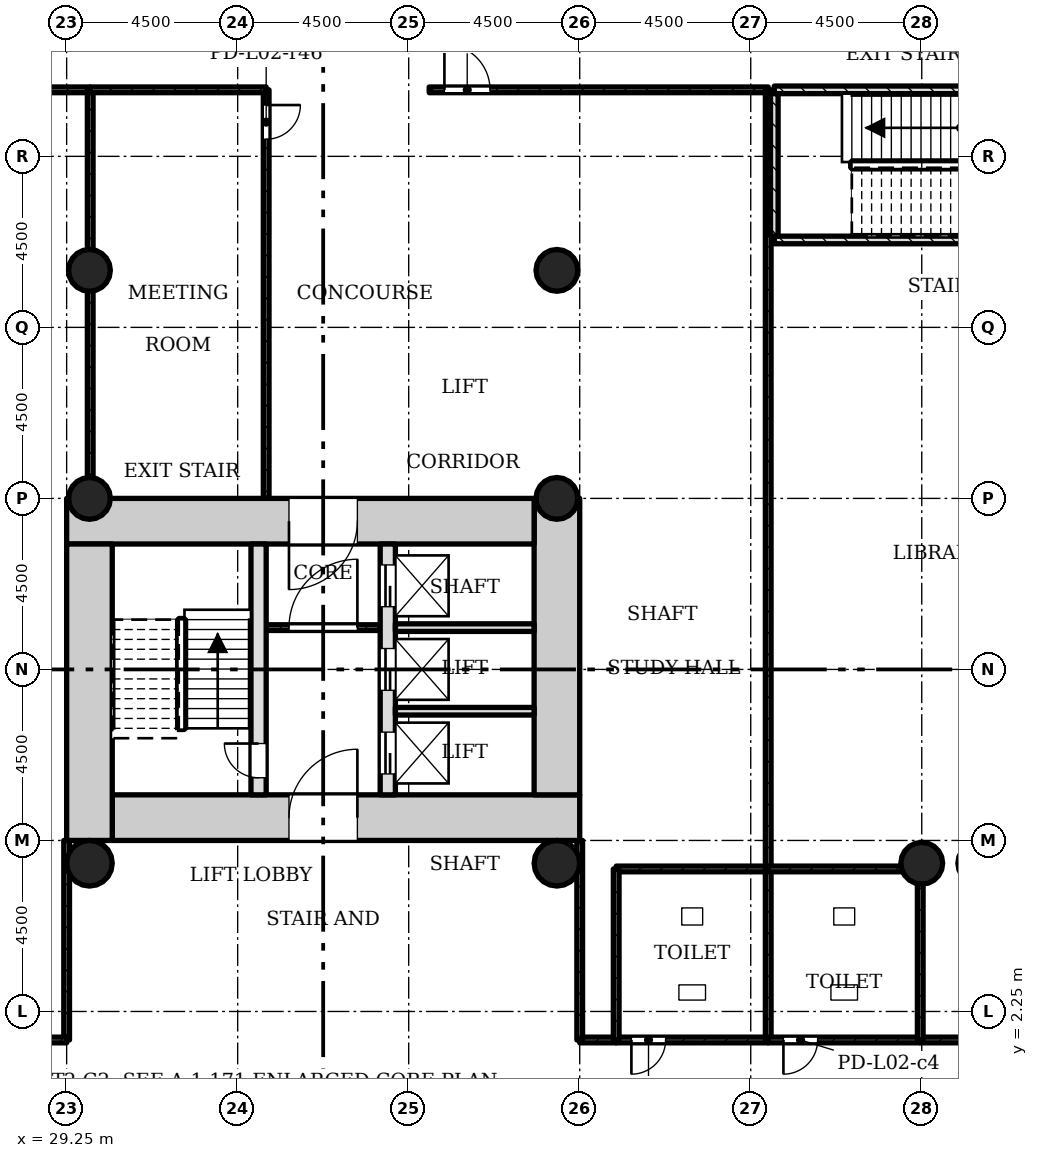
"""IFC4 building model, lengths in metres.
Left out: names, types, materials, properties, quantities, classifications, styles, units other than length and angle.
Written with IfcOpenShell. Run it as: python <this file> out.ifc"""

import sys

from ifc_helpers import new_model, si_unit, direction, frame, frame_2d, origin, origin_2d, place, context, subcontext, project, spatial, rectangle, hollow_circle, extrude, element, fill, save


model = new_model("IFC4")
c1 = context("Model", 3, precision=1e-05, world=origin(), true_north=direction((0.0, 1.0)))
c2 = subcontext(c1, "Body", "Model", "MODEL_VIEW")
j1 = project(units=[si_unit("LENGTHUNIT", "METRE"), si_unit("PLANEANGLEUNIT", "RADIAN")], contexts=[c1])
p1 = place(None, origin())
s1 = spatial("IfcSite", under=j1, at=p1, CompositionType="ELEMENT")
p2 = place(p1, origin())
s2 = spatial("IfcBuilding", under=s1, at=p2, CompositionType="ELEMENT")
p3 = place(p2, frame((0.0, 0.0, 11.0)))
s3 = spatial("IfcBuildingStorey", under=s2, at=p3, CompositionType="ELEMENT", Elevation=11.0)
p4 = place(p3, frame((30.45, 7.35, 0.0), z_axis=(0.0, 0.0, 1.0), x_axis=(1.0, 0.0, 0.0)))
e1 = element("IfcWall", 1, at=p4, inside=s3, PredefinedType="SHEAR", context=c2, shape_type="SweptSolid", body=[
    extrude(rectangle(XDim=12.3, YDim=1.2, at=frame_2d((6.15, 0.0))), origin(), (0.0, 0.0, 1.0), 4.5),
])
p5 = place(p4, frame((4.65, 0.0, 0.0)))
e2 = element("IfcOpeningElement", 2, at=p5, cuts=e1, PredefinedType="OPENING", context=c2, shape_type="SweptSolid", body=[
    extrude(rectangle(XDim=1.8, YDim=2.1, at=frame_2d((0.9, 1.05))), frame((0.0, 0.61, 0.0), z_axis=(0.0, -1.0, 0.0), x_axis=(1.0, 0.0, 0.0)), (0.0, 0.0, 1.0), 1.22),
])
p6 = place(p3, frame((42.15, 7.95, 0.0), z_axis=(0.0, 0.0, 1.0), x_axis=(0.0, 1.0, 0.0)))
e3 = element("IfcWall", 3, at=p6, inside=s3, PredefinedType="SHEAR", context=c2, shape_type="SweptSolid", body=[
    extrude(rectangle(XDim=7.8, YDim=1.2, at=frame_2d((3.9, 0.0))), origin(), (0.0, 0.0, 1.0), 4.5),
])
p7 = place(p3, frame((41.55, 15.15, 0.0), z_axis=(0.0, 0.0, 1.0), x_axis=(-1.0, 0.0, 0.0)))
e4 = element("IfcWall", 4, at=p7, inside=s3, PredefinedType="SHEAR", context=c2, shape_type="SweptSolid", body=[
    extrude(rectangle(XDim=12.3, YDim=1.2, at=frame_2d((6.15, 0.0))), origin(), (0.0, 0.0, 1.0), 4.5),
])
p8 = place(p7, frame((4.65, 0.0, 0.0)))
e5 = element("IfcOpeningElement", 5, at=p8, cuts=e4, PredefinedType="OPENING", context=c2, shape_type="SweptSolid", body=[
    extrude(rectangle(XDim=1.8, YDim=2.1, at=frame_2d((0.9, 1.05))), frame((0.0, 0.61, 0.0), z_axis=(0.0, -1.0, 0.0), x_axis=(1.0, 0.0, 0.0)), (0.0, 0.0, 1.0), 1.22),
])
p9 = place(p3, frame((29.85, 14.55, 0.0), z_axis=(0.0, 0.0, 1.0), x_axis=(0.0, -1.0, 0.0)))
e6 = element("IfcWall", 6, at=p9, inside=s3, PredefinedType="SHEAR", context=c2, shape_type="SweptSolid", body=[
    extrude(rectangle(XDim=7.8, YDim=1.2, at=frame_2d((3.9, 0.0))), origin(), (0.0, 0.0, 1.0), 4.5),
])
p10 = place(p3, frame((34.3, 7.95, 0.0), z_axis=(0.0, 0.0, 1.0), x_axis=(0.0, 1.0, 0.0)))
e7 = element("IfcWall", 7, at=p10, inside=s3, PredefinedType="SHEAR", context=c2, shape_type="SweptSolid", body=[
    extrude(rectangle(XDim=6.6, YDim=0.4, at=frame_2d((3.3, 0.0))), origin(), (0.0, 0.0, 1.0), 4.5),
])
p11 = place(p10, frame((0.45, 0.0, 0.0)))
e8 = element("IfcOpeningElement", 8, at=p11, cuts=e7, PredefinedType="OPENING", context=c2, shape_type="SweptSolid", body=[
    extrude(rectangle(XDim=0.9, YDim=2.1, at=frame_2d((0.45, 1.05))), frame((0.0, 0.21, 0.0), z_axis=(0.0, -1.0, 0.0), x_axis=(1.0, 0.0, 0.0)), (0.0, 0.0, 1.0), 0.42),
])
p12 = place(p3, frame((37.7, 7.95, 0.0), z_axis=(0.0, 0.0, 1.0), x_axis=(0.0, 1.0, 0.0)))
e9 = element("IfcWall", 9, at=p12, inside=s3, PredefinedType="SHEAR", context=c2, shape_type="SweptSolid", body=[
    extrude(rectangle(XDim=6.6, YDim=0.4, at=frame_2d((3.3, 0.0))), origin(), (0.0, 0.0, 1.0), 4.5),
])
p13 = place(p12, frame((0.55, 0.0, 0.0)))
e10 = element("IfcOpeningElement", 10, at=p13, cuts=e9, PredefinedType="OPENING", context=c2, shape_type="SweptSolid", body=[
    extrude(rectangle(XDim=1.1, YDim=2.1, at=frame_2d((0.55, 1.05))), frame((0.0, 0.21, 0.0), z_axis=(0.0, -1.0, 0.0), x_axis=(1.0, 0.0, 0.0)), (0.0, 0.0, 1.0), 0.42),
])
p14 = place(p12, frame((2.75, 0.0, 0.0)))
e11 = element("IfcOpeningElement", 11, at=p14, cuts=e9, PredefinedType="OPENING", context=c2, shape_type="SweptSolid", body=[
    extrude(rectangle(XDim=1.1, YDim=2.1, at=frame_2d((0.55, 1.05))), frame((0.0, 0.21, 0.0), z_axis=(0.0, -1.0, 0.0), x_axis=(1.0, 0.0, 0.0)), (0.0, 0.0, 1.0), 0.42),
])
p15 = place(p12, frame((4.95, 0.0, 0.0)))
e12 = element("IfcOpeningElement", 12, at=p15, cuts=e9, PredefinedType="OPENING", context=c2, shape_type="SweptSolid", body=[
    extrude(rectangle(XDim=1.1, YDim=2.1, at=frame_2d((0.55, 1.05))), frame((0.0, 0.21, 0.0), z_axis=(0.0, -1.0, 0.0), x_axis=(1.0, 0.0, 0.0)), (0.0, 0.0, 1.0), 0.42),
])
for number, where, z_axis, x_axis in (
    (13, (42.15, 15.75, 0.0), (0.0, 0.0, 1.0), (1.0, 0.0, 0.0)),
    (14, (29.85, 15.75, 0.0), (0.0, 0.0, 1.0), (1.0, 0.0, 0.0)),
    (15, (42.15, 21.75, 0.0), (0.0, 0.0, 1.0), (1.0, 0.0, 0.0)),
    (16, (29.85, 21.75, 0.0), (0.0, 0.0, 1.0), (1.0, 0.0, 0.0)),
    (17, (51.75, 6.15, 0.0), (0.0, 0.0, 1.0), (1.0, 0.0, 0.0)),
    (18, (53.25, 6.15, 0.0), (0.0, 0.0, 1.0), (1.0, 0.0, 0.0)),
):
    element("IfcColumn", number, at=place(p3, frame(where, z_axis=z_axis, x_axis=x_axis)), inside=s3, PredefinedType="COLUMN", context=c2, shape_type="SweptSolid", body=[
        extrude(hollow_circle(Radius=0.55, WallThickness=0.04, at=origin_2d()), origin(), (0.0, 0.0, 1.0), 4.5),
    ])
for number, where, z_axis, x_axis in (
    (19, (42.15, 6.15, 0.0), (0.0, 0.0, 1.0), (1.0, 0.0, 0.0)),
    (20, (29.85, 6.15, 0.0), (0.0, 0.0, 1.0), (1.0, 0.0, 0.0)),
):
    element("IfcColumn", number, at=place(p3, frame(where, z_axis=z_axis, x_axis=x_axis)), inside=s3, PredefinedType="COLUMN", context=c2, shape_type="SweptSolid", body=[
        extrude(hollow_circle(Radius=0.6, WallThickness=0.045, at=origin_2d()), origin(), (0.0, 0.0, 1.0), 4.5),
    ])
p16 = place(p3, frame((37.5, 12.35, 0.0), z_axis=(0.0, 0.0, 1.0), x_axis=(-1.0, 0.0, 0.0)))
e21 = element("IfcWall", 21, at=p16, inside=s3, PredefinedType="PARTITIONING", context=c2, shape_type="SweptSolid", body=[
    extrude(rectangle(XDim=3.0, YDim=0.15, at=frame_2d((1.5, 0.0))), origin(), (0.0, 0.0, 1.0), 4.08),
])
p17 = place(p16, frame((0.6, 0.0, 0.0)))
e22 = element("IfcOpeningElement", 22, at=p17, cuts=e21, PredefinedType="OPENING", context=c2, shape_type="SweptSolid", body=[
    extrude(rectangle(XDim=1.8, YDim=2.1, at=frame_2d((0.9, 1.05))), frame((0.0, 0.085, 0.0), z_axis=(0.0, -1.0, 0.0), x_axis=(1.0, 0.0, 0.0)), (0.0, 0.0, 1.0), 0.17),
])
for number, where, z_axis, x_axis in (
    (23, (41.55, 10.15, 0.0), (0.0, 0.0, 1.0), (-1.0, 0.0, 0.0)),
    (24, (41.55, 12.35, 0.0), (0.0, 0.0, 1.0), (-1.0, 0.0, 0.0)),
):
    element("IfcWall", number, at=place(p3, frame(where, z_axis=z_axis, x_axis=x_axis)), inside=s3, PredefinedType="SOLIDWALL", context=c2, shape_type="SweptSolid", body=[
        extrude(rectangle(XDim=3.65, YDim=0.2, at=frame_2d((1.825, 0.0))), origin(), (0.0, 0.0, 1.0), 4.08),
    ])
p18 = place(p3, frame((20.95, 26.5, 0.0), z_axis=(0.0, 0.0, 1.0), x_axis=(1.0, 0.0, 0.0)))
e25 = element("IfcWall", 25, at=p18, inside=s3, PredefinedType="PARTITIONING", context=c2, shape_type="SweptSolid", body=[
    extrude(rectangle(XDim=8.92, YDim=0.15, at=frame_2d((4.46, 0.0))), origin(), (0.0, 0.0, 1.0), 4.08),
])
p19 = place(p18, frame((0.4, 0.0, 0.0)))
e26 = element("IfcOpeningElement", 26, at=p19, cuts=e25, PredefinedType="OPENING", context=c2, shape_type="SweptSolid", body=[
    extrude(rectangle(XDim=1.2, YDim=2.1, at=frame_2d((0.6, 1.05))), frame((0.0, 0.085, 0.0), z_axis=(0.0, -1.0, 0.0), x_axis=(1.0, 0.0, 0.0)), (0.0, 0.0, 1.0), 0.17),
])
p20 = place(p3, frame((29.25, 6.75, 0.0), z_axis=(0.0, 0.0, 1.0), x_axis=(0.0, -1.0, 0.0)))
e27 = element("IfcWall", 27, at=p20, inside=s3, PredefinedType="PARTITIONING", context=c2, shape_type="SweptSolid", body=[
    extrude(rectangle(XDim=5.25, YDim=0.15, at=frame_2d((2.625, 0.0))), origin(), (0.0, 0.0, 1.0), 4.08),
])
p21 = place(p3, frame((29.25, 1.5, 0.0), z_axis=(0.0, 0.0, 1.0), x_axis=(-1.0, 0.0, 0.0)))
e28 = element("IfcWall", 28, at=p21, inside=s3, PredefinedType="PARTITIONING", context=c2, shape_type="SweptSolid", body=[
    extrude(rectangle(XDim=8.3, YDim=0.15, at=frame_2d((4.15, 0.0))), origin(), (0.0, 0.0, 1.0), 4.08),
])
p22 = place(p3, frame((29.87, 26.5, 0.0), z_axis=(0.0, 0.0, 1.0), x_axis=(0.0, -1.0, 0.0)))
e29 = element("IfcWall", 29, at=p22, inside=s3, PredefinedType="PARTITIONING", context=c2, shape_type="SweptSolid", body=[
    extrude(rectangle(XDim=10.75, YDim=0.15, at=frame_2d((5.375, 0.0))), origin(), (0.0, 0.0, 1.0), 4.08),
])
p23 = place(p3, frame((34.5, 26.5, 0.0), z_axis=(0.0, 0.0, 1.0), x_axis=(0.0, -1.0, 0.0)))
e30 = element("IfcWall", 30, at=p23, inside=s3, PredefinedType="PARTITIONING", context=c2, shape_type="SweptSolid", body=[
    extrude(rectangle(XDim=10.75, YDim=0.15, at=frame_2d((5.375, 0.0))), origin(), (0.0, 0.0, 1.0), 4.08),
])
p24 = place(p23, frame((0.4, 0.0, 0.0)))
e31 = element("IfcOpeningElement", 31, at=p24, cuts=e30, PredefinedType="OPENING", context=c2, shape_type="SweptSolid", body=[
    extrude(rectangle(XDim=0.9, YDim=2.1, at=frame_2d((0.45, 1.05))), frame((0.0, 0.085, 0.0), z_axis=(0.0, -1.0, 0.0), x_axis=(1.0, 0.0, 0.0)), (0.0, 0.0, 1.0), 0.17),
])
p25 = place(p3, frame((29.87, 26.5, 0.0), z_axis=(0.0, 0.0, 1.0), x_axis=(1.0, 0.0, 0.0)))
e32 = element("IfcWall", 32, at=p25, inside=s3, PredefinedType="PARTITIONING", context=c2, shape_type="SweptSolid", body=[
    extrude(rectangle(XDim=4.63, YDim=0.15, at=frame_2d((2.315, 0.0))), origin(), (0.0, 0.0, 1.0), 4.08),
])
p26 = place(p3, frame((43.71, 1.5, 0.0), z_axis=(0.0, 0.0, 1.0), x_axis=(-1.0, 0.0, 0.0)))
e33 = element("IfcWall", 33, at=p26, inside=s3, PredefinedType="PARTITIONING", context=c2, shape_type="SweptSolid", body=[
    extrude(rectangle(XDim=0.96, YDim=0.15, at=frame_2d((0.48, 0.0))), origin(), (0.0, 0.0, 1.0), 4.08),
])
p27 = place(p3, frame((42.75, 1.5, 0.0), z_axis=(0.0, 0.0, 1.0), x_axis=(0.0, 1.0, 0.0)))
e34 = element("IfcWall", 34, at=p27, inside=s3, PredefinedType="PARTITIONING", context=c2, shape_type="SweptSolid", body=[
    extrude(rectangle(XDim=5.25, YDim=0.15, at=frame_2d((2.625, 0.0))), origin(), (0.0, 0.0, 1.0), 4.08),
])
p28 = place(p3, frame((38.79, 26.5, 0.0), z_axis=(0.0, 0.0, 1.0), x_axis=(1.0, 0.0, 0.0)))
e35 = element("IfcWall", 35, at=p28, inside=s3, PredefinedType="PARTITIONING", context=c2, shape_type="SweptSolid", body=[
    extrude(rectangle(XDim=8.92, YDim=0.15, at=frame_2d((4.46, 0.0))), origin(), (0.0, 0.0, 1.0), 4.08),
])
p29 = place(p28, frame((0.4, 0.0, 0.0)))
e36 = element("IfcOpeningElement", 36, at=p29, cuts=e35, PredefinedType="OPENING", context=c2, shape_type="SweptSolid", body=[
    extrude(rectangle(XDim=1.2, YDim=2.1, at=frame_2d((0.6, 1.05))), frame((0.0, 0.085, 0.0), z_axis=(0.0, -1.0, 0.0), x_axis=(1.0, 0.0, 0.0)), (0.0, 0.0, 1.0), 0.17),
])
p30 = place(p3, frame((47.71, 26.5, 0.0), z_axis=(0.0, 0.0, 1.0), x_axis=(0.0, -1.0, 0.0)))
e37 = element("IfcWall", 37, at=p30, inside=s3, PredefinedType="PARTITIONING", context=c2, shape_type="SweptSolid", body=[
    extrude(rectangle(XDim=20.5, YDim=0.15, at=frame_2d((10.25, 0.0))), origin(), (0.0, 0.0, 1.0), 4.08),
])
p31 = place(p3, frame((56.63, 1.5, 0.0), z_axis=(0.0, 0.0, 1.0), x_axis=(-1.0, 0.0, 0.0)))
e38 = element("IfcWall", 38, at=p31, inside=s3, PredefinedType="PARTITIONING", context=c2, shape_type="SweptSolid", body=[
    extrude(rectangle(XDim=4.92, YDim=0.15, at=frame_2d((2.46, 0.0))), origin(), (0.0, 0.0, 1.0), 4.08),
])
p32 = place(p31, frame((0.4, 0.0, 0.0)))
e39 = element("IfcOpeningElement", 39, at=p32, cuts=e38, PredefinedType="OPENING", context=c2, shape_type="SweptSolid", body=[
    extrude(rectangle(XDim=1.2, YDim=2.1, at=frame_2d((0.6, 1.05))), frame((0.0, 0.085, 0.0), z_axis=(0.0, -1.0, 0.0), x_axis=(1.0, 0.0, 0.0)), (0.0, 0.0, 1.0), 0.17),
])
p33 = place(p3, frame((43.71, 1.5, 0.0), z_axis=(0.0, 0.0, 1.0), x_axis=(1.0, 0.0, 0.0)))
e40 = element("IfcWall", 40, at=p33, inside=s3, PredefinedType="PARTITIONING", context=c2, shape_type="SweptSolid", body=[
    extrude(rectangle(XDim=4.0, YDim=0.15, at=frame_2d((2.0, 0.0))), origin(), (0.0, 0.0, 1.0), 4.08),
])
p34 = place(p33, frame((0.4, 0.0, 0.0)))
e41 = element("IfcOpeningElement", 41, at=p34, cuts=e40, PredefinedType="OPENING", context=c2, shape_type="SweptSolid", body=[
    extrude(rectangle(XDim=0.9, YDim=2.1, at=frame_2d((0.45, 1.05))), frame((0.0, 0.085, 0.0), z_axis=(0.0, -1.0, 0.0), x_axis=(1.0, 0.0, 0.0)), (0.0, 0.0, 1.0), 0.17),
])
p35 = place(p3, frame((47.71, 6.0, 0.0), z_axis=(0.0, 0.0, 1.0), x_axis=(-1.0, 0.0, 0.0)))
e42 = element("IfcWall", 42, at=p35, inside=s3, PredefinedType="PARTITIONING", context=c2, shape_type="SweptSolid", body=[
    extrude(rectangle(XDim=4.0, YDim=0.15, at=frame_2d((2.0, 0.0))), origin(), (0.0, 0.0, 1.0), 4.08),
])
for number, where, z_axis, x_axis in (
    (43, (43.71, 6.0, 0.0), (0.0, 0.0, 1.0), (0.0, -1.0, 0.0)),
    (44, (47.71, 1.5, 0.0), (0.0, 0.0, 1.0), (0.0, 1.0, 0.0)),
):
    element("IfcWall", number, at=place(p3, frame(where, z_axis=z_axis, x_axis=x_axis)), inside=s3, PredefinedType="PARTITIONING", context=c2, shape_type="SweptSolid", body=[
        extrude(rectangle(XDim=4.5, YDim=0.15, at=frame_2d((2.25, 0.0))), origin(), (0.0, 0.0, 1.0), 4.08),
    ])
p36 = place(p3, frame((47.71, 1.5, 0.0), z_axis=(0.0, 0.0, 1.0), x_axis=(1.0, 0.0, 0.0)))
e45 = element("IfcWall", 45, at=p36, inside=s3, PredefinedType="PARTITIONING", context=c2, shape_type="SweptSolid", body=[
    extrude(rectangle(XDim=4.0, YDim=0.15, at=frame_2d((2.0, 0.0))), origin(), (0.0, 0.0, 1.0), 4.08),
])
p37 = place(p36, frame((0.4, 0.0, 0.0)))
e46 = element("IfcOpeningElement", 46, at=p37, cuts=e45, PredefinedType="OPENING", context=c2, shape_type="SweptSolid", body=[
    extrude(rectangle(XDim=0.9, YDim=2.1, at=frame_2d((0.45, 1.05))), frame((0.0, 0.085, 0.0), z_axis=(0.0, -1.0, 0.0), x_axis=(1.0, 0.0, 0.0)), (0.0, 0.0, 1.0), 0.17),
])
p38 = place(p3, frame((51.71, 1.5, 0.0), z_axis=(0.0, 0.0, 1.0), x_axis=(0.0, 1.0, 0.0)))
e47 = element("IfcWall", 47, at=p38, inside=s3, PredefinedType="PARTITIONING", context=c2, shape_type="SweptSolid", body=[
    extrude(rectangle(XDim=4.5, YDim=0.15, at=frame_2d((2.25, 0.0))), origin(), (0.0, 0.0, 1.0), 4.08),
])
p39 = place(p3, frame((51.71, 6.0, 0.0), z_axis=(0.0, 0.0, 1.0), x_axis=(-1.0, 0.0, 0.0)))
e48 = element("IfcWall", 48, at=p39, inside=s3, PredefinedType="PARTITIONING", context=c2, shape_type="SweptSolid", body=[
    extrude(rectangle(XDim=4.0, YDim=0.15, at=frame_2d((2.0, 0.0))), origin(), (0.0, 0.0, 1.0), 4.08),
])
p40 = place(p3, frame((47.87, 26.5, 0.0), z_axis=(0.0, 0.0, 1.0), x_axis=(1.0, 0.0, 0.0)))
e49 = element("IfcWall", 49, at=p40, inside=s3, PredefinedType="SHEAR", context=c2, shape_type="SweptSolid", body=[
    extrude(rectangle(XDim=6.8, YDim=0.2, at=frame_2d((3.4, 0.0))), origin(), (0.0, 0.0, 1.0), 4.08),
])
p41 = place(p40, frame((5.35, 0.0, 0.0)))
e50 = element("IfcOpeningElement", 50, at=p41, cuts=e49, PredefinedType="OPENING", context=c2, shape_type="SweptSolid", body=[
    extrude(rectangle(XDim=0.9, YDim=2.1, at=frame_2d((0.45, 1.05))), frame((0.0, 0.11, 0.0), z_axis=(0.0, -1.0, 0.0), x_axis=(1.0, 0.0, 0.0)), (0.0, 0.0, 1.0), 0.22),
])
p42 = place(p3, frame((47.87, 22.55, 0.0), z_axis=(0.0, 0.0, 1.0), x_axis=(1.0, 0.0, 0.0)))
e51 = element("IfcWall", 51, at=p42, inside=s3, PredefinedType="SHEAR", context=c2, shape_type="SweptSolid", body=[
    extrude(rectangle(XDim=6.8, YDim=0.2, at=frame_2d((3.4, 0.0))), origin(), (0.0, 0.0, 1.0), 4.08),
])
p43 = place(p3, frame((47.87, 22.65, 0.0), z_axis=(0.0, 0.0, 1.0), x_axis=(0.0, 1.0, 0.0)))
e52 = element("IfcWall", 52, at=p43, inside=s3, PredefinedType="SHEAR", context=c2, shape_type="SweptSolid", body=[
    extrude(rectangle(XDim=3.75, YDim=0.2, at=frame_2d((1.875, 0.0))), origin(), (0.0, 0.0, 1.0), 4.08),
])
p44 = place(p17, origin())
e53 = element("IfcDoor", 53, at=p44, inside=s3, OperationType="SINGLE_SWING_LEFT", PredefinedType="DOOR", context=c2, shape_type="SweptSolid", body=[
    extrude(rectangle(XDim=1.8, YDim=2.1, at=frame_2d((0.9, 1.05))), frame((0.0, 0.025, 0.0), z_axis=(0.0, -1.0, 0.0), x_axis=(1.0, 0.0, 0.0)), (0.0, 0.0, 1.0), 0.05),
])
fill(e22, e53)
p45 = place(p24, origin())
e54 = element("IfcDoor", 54, at=p45, inside=s3, OperationType="SINGLE_SWING_RIGHT", PredefinedType="DOOR", context=c2, shape_type="SweptSolid", body=[
    extrude(rectangle(XDim=0.9, YDim=2.1, at=frame_2d((0.45, 1.05))), frame((0.0, 0.025, 0.0), z_axis=(0.0, -1.0, 0.0), x_axis=(1.0, 0.0, 0.0)), (0.0, 0.0, 1.0), 0.05),
])
fill(e31, e54)
p46 = place(p29, origin())
e55 = element("IfcDoor", 55, at=p46, inside=s3, OperationType="SINGLE_SWING_RIGHT", PredefinedType="DOOR", context=c2, shape_type="SweptSolid", body=[
    extrude(rectangle(XDim=1.2, YDim=2.1, at=frame_2d((0.6, 1.05))), frame((0.0, 0.025, 0.0), z_axis=(0.0, -1.0, 0.0), x_axis=(1.0, 0.0, 0.0)), (0.0, 0.0, 1.0), 0.05),
])
fill(e36, e55)
p47 = place(p34, origin())
e56 = element("IfcDoor", 56, at=p47, inside=s3, OperationType="SINGLE_SWING_LEFT", PredefinedType="DOOR", context=c2, shape_type="SweptSolid", body=[
    extrude(rectangle(XDim=0.9, YDim=2.1, at=frame_2d((0.45, 1.05))), frame((0.0, 0.025, 0.0), z_axis=(0.0, -1.0, 0.0), x_axis=(1.0, 0.0, 0.0)), (0.0, 0.0, 1.0), 0.05),
])
fill(e41, e56)
p48 = place(p37, origin())
e57 = element("IfcDoor", 57, at=p48, inside=s3, OperationType="SINGLE_SWING_LEFT", PredefinedType="DOOR", context=c2, shape_type="SweptSolid", body=[
    extrude(rectangle(XDim=0.9, YDim=2.1, at=frame_2d((0.45, 1.05))), frame((0.0, 0.025, 0.0), z_axis=(0.0, -1.0, 0.0), x_axis=(1.0, 0.0, 0.0)), (0.0, 0.0, 1.0), 0.05),
])
fill(e46, e57)
p49 = place(p11, origin())
e58 = element("IfcDoor", 58, at=p49, inside=s3, OperationType="SINGLE_SWING_LEFT", PredefinedType="DOOR", context=c2, shape_type="SweptSolid", body=[
    extrude(rectangle(XDim=0.9, YDim=2.1, at=frame_2d((0.45, 1.05))), frame((0.0, 0.025, 0.0), z_axis=(0.0, -1.0, 0.0), x_axis=(1.0, 0.0, 0.0)), (0.0, 0.0, 1.0), 0.05),
])
fill(e8, e58)
p50 = place(p13, origin())
e59 = element("IfcDoor", 59, at=p50, inside=s3, OperationType="SLIDING_TO_LEFT", PredefinedType="DOOR", context=c2, shape_type="SweptSolid", body=[
    extrude(rectangle(XDim=1.1, YDim=2.1, at=frame_2d((0.55, 1.05))), frame((0.0, 0.025, 0.0), z_axis=(0.0, -1.0, 0.0), x_axis=(1.0, 0.0, 0.0)), (0.0, 0.0, 1.0), 0.05),
])
fill(e10, e59)
p51 = place(p14, origin())
e60 = element("IfcDoor", 60, at=p51, inside=s3, OperationType="SLIDING_TO_LEFT", PredefinedType="DOOR", context=c2, shape_type="SweptSolid", body=[
    extrude(rectangle(XDim=1.1, YDim=2.1, at=frame_2d((0.55, 1.05))), frame((0.0, 0.025, 0.0), z_axis=(0.0, -1.0, 0.0), x_axis=(1.0, 0.0, 0.0)), (0.0, 0.0, 1.0), 0.05),
])
fill(e11, e60)
p52 = place(p15, origin())
e61 = element("IfcDoor", 61, at=p52, inside=s3, OperationType="SLIDING_TO_LEFT", PredefinedType="DOOR", context=c2, shape_type="SweptSolid", body=[
    extrude(rectangle(XDim=1.1, YDim=2.1, at=frame_2d((0.55, 1.05))), frame((0.0, 0.025, 0.0), z_axis=(0.0, -1.0, 0.0), x_axis=(1.0, 0.0, 0.0)), (0.0, 0.0, 1.0), 0.05),
])
fill(e12, e61)
p53 = place(p5, origin())
e62 = element("IfcDoor", 62, at=p53, inside=s3, OperationType="SINGLE_SWING_LEFT", PredefinedType="DOOR", context=c2, shape_type="SweptSolid", body=[
    extrude(rectangle(XDim=1.8, YDim=2.1, at=frame_2d((0.9, 1.05))), frame((0.0, 0.025, 0.0), z_axis=(0.0, -1.0, 0.0), x_axis=(1.0, 0.0, 0.0)), (0.0, 0.0, 1.0), 0.05),
])
fill(e2, e62)
p54 = place(p8, origin())
e63 = element("IfcDoor", 63, at=p54, inside=s3, OperationType="SINGLE_SWING_LEFT", PredefinedType="DOOR", context=c2, shape_type="SweptSolid", body=[
    extrude(rectangle(XDim=1.8, YDim=2.1, at=frame_2d((0.9, 1.05))), frame((0.0, 0.025, 0.0), z_axis=(0.0, -1.0, 0.0), x_axis=(1.0, 0.0, 0.0)), (0.0, 0.0, 1.0), 0.05),
])
fill(e5, e63)
save(model, sys.argv[1])
